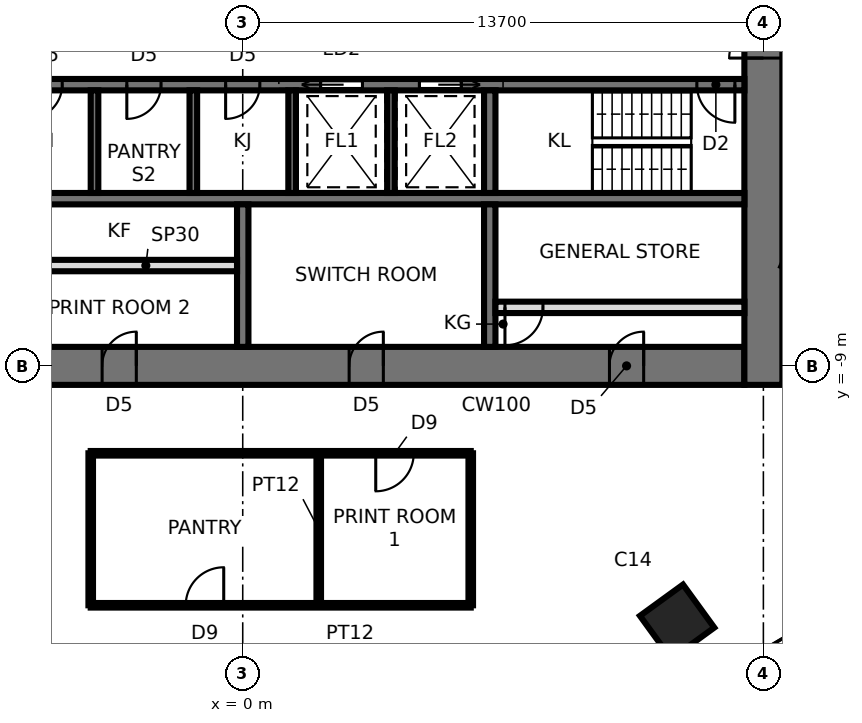
"""IFC4 building model, lengths in metres.
Left out: names, types, materials, properties, quantities, classifications, styles, units other than length and angle.
Written with IfcOpenShell. Run it as: python <this file> out.ifc"""

import sys

from ifc_helpers import new_model, si_unit, direction, frame, frame_2d, origin, origin_2d, place, context, subcontext, project, spatial, rectangle, extrude, element, fill, save


model = new_model("IFC4")
c1 = context("Model", 3, precision=1e-05, world=origin(), true_north=direction((0.0, 1.0)))
c2 = subcontext(c1, "Body", "Model", "MODEL_VIEW")
j1 = project(units=[si_unit("LENGTHUNIT", "METRE"), si_unit("PLANEANGLEUNIT", "RADIAN")], contexts=[c1])
p1 = place(None, origin())
s1 = spatial("IfcSite", under=j1, at=p1, CompositionType="ELEMENT")
p2 = place(p1, origin())
s2 = spatial("IfcBuilding", under=s1, at=p2, CompositionType="ELEMENT")
p3 = place(p2, frame((0.0, 0.0, 215.0)))
s3 = spatial("IfcBuildingStorey", under=s2, at=p3, CompositionType="ELEMENT", Elevation=215.0)
p4 = place(p3, frame((11.43, -15.733, 0.0), z_axis=(0.0, 0.0, 1.0), x_axis=(0.587785252292, -0.809016994375, 0.0)))
e1 = element("IfcColumn", 1, at=p4, inside=s3, PredefinedType="COLUMN", context=c2, shape_type="SweptSolid", body=[
    extrude(rectangle(XDim=1.4, YDim=1.4, at=origin_2d()), origin(), (0.0, 0.0, 1.0), 3.9),
])
p5 = place(p3, frame((-13.2, -9.0, 0.0), z_axis=(0.0, 0.0, 1.0), x_axis=(1.0, 0.0, 0.0)))
e2 = element("IfcWall", 2, at=p5, inside=s3, PredefinedType="SHEAR", context=c2, shape_type="SweptSolid", body=[
    extrude(rectangle(XDim=26.4, YDim=1.0, at=frame_2d((13.2, 0.0))), origin(), (0.0, 0.0, 1.0), 3.9),
])
p6 = place(p5, frame((2.65, 0.0, 0.0)))
e3 = element("IfcOpeningElement", 3, at=p6, cuts=e2, PredefinedType="OPENING", context=c2, shape_type="SweptSolid", body=[
    extrude(rectangle(XDim=0.9, YDim=2.1, at=frame_2d((0.45, 1.05))), frame((0.0, 0.51, 0.0), z_axis=(0.0, -1.0, 0.0), x_axis=(1.0, 0.0, 0.0)), (0.0, 0.0, 1.0), 1.02),
])
p7 = place(p5, frame((9.5, 0.0, 0.0)))
e4 = element("IfcOpeningElement", 4, at=p7, cuts=e2, PredefinedType="OPENING", context=c2, shape_type="SweptSolid", body=[
    extrude(rectangle(XDim=0.9, YDim=2.1, at=frame_2d((0.45, 1.05))), frame((0.0, 0.51, 0.0), z_axis=(0.0, -1.0, 0.0), x_axis=(1.0, 0.0, 0.0)), (0.0, 0.0, 1.0), 1.02),
])
p8 = place(p5, frame((16.0, 0.0, 0.0)))
e5 = element("IfcOpeningElement", 5, at=p8, cuts=e2, PredefinedType="OPENING", context=c2, shape_type="SweptSolid", body=[
    extrude(rectangle(XDim=0.9, YDim=2.1, at=frame_2d((0.45, 1.05))), frame((0.0, 0.51, 0.0), z_axis=(0.0, -1.0, 0.0), x_axis=(1.0, 0.0, 0.0)), (0.0, 0.0, 1.0), 1.02),
])
p9 = place(p5, frame((22.85, 0.0, 0.0)))
e6 = element("IfcOpeningElement", 6, at=p9, cuts=e2, PredefinedType="OPENING", context=c2, shape_type="SweptSolid", body=[
    extrude(rectangle(XDim=0.9, YDim=2.1, at=frame_2d((0.45, 1.05))), frame((0.0, 0.51, 0.0), z_axis=(0.0, -1.0, 0.0), x_axis=(1.0, 0.0, 0.0)), (0.0, 0.0, 1.0), 1.02),
])
p10 = place(p3, frame((13.7, -9.5, 0.0), z_axis=(0.0, 0.0, 1.0), x_axis=(0.0, 1.0, 0.0)))
e7 = element("IfcWall", 7, at=p10, inside=s3, PredefinedType="SHEAR", context=c2, shape_type="SweptSolid", body=[
    extrude(rectangle(XDim=19.0, YDim=1.0, at=frame_2d((9.5, 0.0))), origin(), (0.0, 0.0, 1.0), 3.9),
])
p11 = place(p10, frame((8.6, 0.0, 0.0)))
e8 = element("IfcOpeningElement", 8, at=p11, cuts=e7, PredefinedType="OPENING", context=c2, shape_type="SweptSolid", body=[
    extrude(rectangle(XDim=1.8, YDim=2.4, at=frame_2d((0.9, 1.2))), frame((0.0, 0.51, 0.0), z_axis=(0.0, -1.0, 0.0), x_axis=(1.0, 0.0, 0.0)), (0.0, 0.0, 1.0), 1.02),
])
p12 = place(p3, frame((-13.2, -1.6, 0.0), z_axis=(0.0, 0.0, 1.0), x_axis=(1.0, 0.0, 0.0)))
e9 = element("IfcWall", 9, at=p12, inside=s3, PredefinedType="SHEAR", context=c2, shape_type="SweptSolid", body=[
    extrude(rectangle(XDim=26.4, YDim=0.3, at=frame_2d((13.2, 0.0))), origin(), (0.0, 0.0, 1.0), 3.9),
])
p13 = place(p12, frame((25.15, 0.0, 0.0)))
e10 = element("IfcOpeningElement", 10, at=p13, cuts=e9, PredefinedType="OPENING", context=c2, shape_type="SweptSolid", body=[
    extrude(rectangle(XDim=1.0, YDim=2.1, at=frame_2d((0.5, 1.05))), frame((0.0, 0.16, 0.0), z_axis=(0.0, -1.0, 0.0), x_axis=(1.0, 0.0, 0.0)), (0.0, 0.0, 1.0), 0.32),
])
p14 = place(p12, frame((7.55, 0.0, 0.0)))
e11 = element("IfcOpeningElement", 11, at=p14, cuts=e9, PredefinedType="OPENING", context=c2, shape_type="SweptSolid", body=[
    extrude(rectangle(XDim=0.9, YDim=2.1, at=frame_2d((0.45, 1.05))), frame((0.0, 0.16, 0.0), z_axis=(0.0, -1.0, 0.0), x_axis=(1.0, 0.0, 0.0)), (0.0, 0.0, 1.0), 0.32),
])
p15 = place(p12, frame((10.15, 0.0, 0.0)))
e12 = element("IfcOpeningElement", 12, at=p15, cuts=e9, PredefinedType="OPENING", context=c2, shape_type="SweptSolid", body=[
    extrude(rectangle(XDim=0.9, YDim=2.1, at=frame_2d((0.45, 1.05))), frame((0.0, 0.16, 0.0), z_axis=(0.0, -1.0, 0.0), x_axis=(1.0, 0.0, 0.0)), (0.0, 0.0, 1.0), 0.32),
])
p16 = place(p12, frame((12.75, 0.0, 0.0)))
e13 = element("IfcOpeningElement", 13, at=p16, cuts=e9, PredefinedType="OPENING", context=c2, shape_type="SweptSolid", body=[
    extrude(rectangle(XDim=0.9, YDim=2.1, at=frame_2d((0.45, 1.05))), frame((0.0, 0.16, 0.0), z_axis=(0.0, -1.0, 0.0), x_axis=(1.0, 0.0, 0.0)), (0.0, 0.0, 1.0), 0.32),
])
p17 = place(p12, frame((15.25, 0.0, 0.0)))
e14 = element("IfcOpeningElement", 14, at=p17, cuts=e9, PredefinedType="OPENING", context=c2, shape_type="SweptSolid", body=[
    extrude(rectangle(XDim=1.1, YDim=2.3, at=frame_2d((0.55, 1.15))), frame((0.0, 0.16, 0.0), z_axis=(0.0, -1.0, 0.0), x_axis=(1.0, 0.0, 0.0)), (0.0, 0.0, 1.0), 0.32),
])
p18 = place(p12, frame((17.85, 0.0, 0.0)))
e15 = element("IfcOpeningElement", 15, at=p18, cuts=e9, PredefinedType="OPENING", context=c2, shape_type="SweptSolid", body=[
    extrude(rectangle(XDim=1.1, YDim=2.3, at=frame_2d((0.55, 1.15))), frame((0.0, 0.16, 0.0), z_axis=(0.0, -1.0, 0.0), x_axis=(1.0, 0.0, 0.0)), (0.0, 0.0, 1.0), 0.32),
])
p19 = place(p12, frame((4.85, 0.0, 0.0)))
e16 = element("IfcOpeningElement", 16, at=p19, cuts=e9, PredefinedType="OPENING", context=c2, shape_type="SweptSolid", body=[
    extrude(rectangle(XDim=1.1, YDim=2.3, at=frame_2d((0.55, 1.15))), frame((0.0, 0.16, 0.0), z_axis=(0.0, -1.0, 0.0), x_axis=(1.0, 0.0, 0.0)), (0.0, 0.0, 1.0), 0.32),
])
p20 = place(p12, frame((2.25, 0.0, 0.0)))
e17 = element("IfcOpeningElement", 17, at=p20, cuts=e9, PredefinedType="OPENING", context=c2, shape_type="SweptSolid", body=[
    extrude(rectangle(XDim=1.1, YDim=2.3, at=frame_2d((0.55, 1.15))), frame((0.0, 0.16, 0.0), z_axis=(0.0, -1.0, 0.0), x_axis=(1.0, 0.0, 0.0)), (0.0, 0.0, 1.0), 0.32),
])
p21 = place(p12, frame((0.35, 0.0, 0.0)))
e18 = element("IfcOpeningElement", 18, at=p21, cuts=e9, PredefinedType="OPENING", context=c2, shape_type="SweptSolid", body=[
    extrude(rectangle(XDim=0.9, YDim=2.1, at=frame_2d((0.45, 1.05))), frame((0.0, 0.16, 0.0), z_axis=(0.0, -1.0, 0.0), x_axis=(1.0, 0.0, 0.0)), (0.0, 0.0, 1.0), 0.32),
])
p22 = place(p3, frame((-13.2, -4.6, 0.0), z_axis=(0.0, 0.0, 1.0), x_axis=(1.0, 0.0, 0.0)))
e19 = element("IfcWall", 19, at=p22, inside=s3, PredefinedType="SHEAR", context=c2, shape_type="SweptSolid", body=[
    extrude(rectangle(XDim=26.4, YDim=0.3, at=frame_2d((13.2, 0.0))), origin(), (0.0, 0.0, 1.0), 3.9),
])
p23 = place(p3, frame((6.5, -1.75, 0.0), z_axis=(0.0, 0.0, 1.0), x_axis=(0.0, -1.0, 0.0)))
e20 = element("IfcWall", 20, at=p23, inside=s3, PredefinedType="SHEAR", context=c2, shape_type="SweptSolid", body=[
    extrude(rectangle(XDim=2.7, YDim=0.3, at=frame_2d((1.35, 0.0))), origin(), (0.0, 0.0, 1.0), 3.9),
])
p24 = place(p3, frame((6.5, -4.75, 0.0), z_axis=(0.0, 0.0, 1.0), x_axis=(0.0, -1.0, 0.0)))
e21 = element("IfcWall", 21, at=p24, inside=s3, PredefinedType="SHEAR", context=c2, shape_type="SweptSolid", body=[
    extrude(rectangle(XDim=3.75, YDim=0.3, at=frame_2d((1.875, 0.0))), origin(), (0.0, 0.0, 1.0), 3.9),
])
for number, where, z_axis, x_axis in (
    (22, (-3.9, -1.75, 0.0), (0.0, 0.0, 1.0), (0.0, -1.0, 0.0)),
    (23, (-1.3, -1.75, 0.0), (0.0, 0.0, 1.0), (0.0, -1.0, 0.0)),
    (24, (1.3, -1.75, 0.0), (0.0, 0.0, 1.0), (0.0, -1.0, 0.0)),
    (25, (3.9, -1.75, 0.0), (0.0, 0.0, 1.0), (0.0, -1.0, 0.0)),
):
    element("IfcWall", number, at=place(p3, frame(where, z_axis=z_axis, x_axis=x_axis)), inside=s3, PredefinedType="SHEAR", context=c2, shape_type="SweptSolid", body=[
        extrude(rectangle(XDim=2.7, YDim=0.2, at=frame_2d((1.35, 0.0))), origin(), (0.0, 0.0, 1.0), 3.9),
    ])
p25 = place(p3, frame((0.0, -4.75, 0.0), z_axis=(0.0, 0.0, 1.0), x_axis=(0.0, -1.0, 0.0)))
e26 = element("IfcWall", 26, at=p25, inside=s3, PredefinedType="SHEAR", context=c2, shape_type="SweptSolid", body=[
    extrude(rectangle(XDim=3.75, YDim=0.3, at=frame_2d((1.875, 0.0))), origin(), (0.0, 0.0, 1.0), 3.9),
])
p26 = place(p3, frame((-6.35, -6.36, 0.0), z_axis=(0.0, 0.0, 1.0), x_axis=(1.0, 0.0, 0.0)))
e27 = element("IfcWall", 27, at=p26, inside=s3, PredefinedType="PARTITIONING", context=c2, shape_type="SweptSolid", body=[
    extrude(rectangle(XDim=6.2, YDim=0.3, at=frame_2d((3.1, 0.0))), origin(), (0.0, 0.0, 1.0), 3.74),
])
p27 = place(p26, frame((0.25, 0.0, 0.0)))
e28 = element("IfcOpeningElement", 28, at=p27, cuts=e27, PredefinedType="OPENING", context=c2, shape_type="SweptSolid", body=[
    extrude(rectangle(XDim=1.0, YDim=2.4, at=frame_2d((0.5, 1.2))), frame((0.0, 0.16, 0.0), z_axis=(0.0, -1.0, 0.0), x_axis=(1.0, 0.0, 0.0)), (0.0, 0.0, 1.0), 0.32),
])
p28 = place(p3, frame((6.65, -7.46, 0.0), z_axis=(0.0, 0.0, 1.0), x_axis=(1.0, 0.0, 0.0)))
e29 = element("IfcWall", 29, at=p28, inside=s3, PredefinedType="PARTITIONING", context=c2, shape_type="SweptSolid", body=[
    extrude(rectangle(XDim=6.55, YDim=0.3, at=frame_2d((3.275, 0.0))), origin(), (0.0, 0.0, 1.0), 3.74),
])
p29 = place(p28, frame((0.25, 0.0, 0.0)))
e30 = element("IfcOpeningElement", 30, at=p29, cuts=e29, PredefinedType="OPENING", context=c2, shape_type="SweptSolid", body=[
    extrude(rectangle(XDim=1.0, YDim=2.4, at=frame_2d((0.5, 1.2))), frame((0.0, 0.16, 0.0), z_axis=(0.0, -1.0, 0.0), x_axis=(1.0, 0.0, 0.0)), (0.0, 0.0, 1.0), 0.32),
])
p30 = place(p3, frame((-4.0, -15.3, 0.0), z_axis=(0.0, 0.0, 1.0), x_axis=(0.0, 1.0, 0.0)))
e31 = element("IfcWall", 31, at=p30, inside=s3, PredefinedType="PARTITIONING", context=c2, shape_type="SweptSolid", body=[
    extrude(rectangle(XDim=4.0, YDim=0.12, at=frame_2d((2.0, 0.0))), origin(), (0.0, 0.0, 1.0), 3.74),
])
p31 = place(p3, frame((6.0, -15.3, 0.0), z_axis=(0.0, 0.0, 1.0), x_axis=(-1.0, 0.0, 0.0)))
e32 = element("IfcWall", 32, at=p31, inside=s3, PredefinedType="PARTITIONING", context=c2, shape_type="SweptSolid", body=[
    extrude(rectangle(XDim=10.0, YDim=0.12, at=frame_2d((5.0, 0.0))), origin(), (0.0, 0.0, 1.0), 3.334),
])
p32 = place(p31, frame((6.5, 0.0, 0.0)))
e33 = element("IfcOpeningElement", 33, at=p32, cuts=e32, PredefinedType="OPENING", context=c2, shape_type="SweptSolid", body=[
    extrude(rectangle(XDim=1.0, YDim=2.4, at=frame_2d((0.5, 1.2))), frame((0.0, 0.07, 0.0), z_axis=(0.0, -1.0, 0.0), x_axis=(1.0, 0.0, 0.0)), (0.0, 0.0, 1.0), 0.14),
])
p33 = place(p3, frame((-4.0, -11.3, 0.0), z_axis=(0.0, 0.0, 1.0), x_axis=(1.0, 0.0, 0.0)))
e34 = element("IfcWall", 34, at=p33, inside=s3, PredefinedType="PARTITIONING", context=c2, shape_type="SweptSolid", body=[
    extrude(rectangle(XDim=10.0, YDim=0.12, at=frame_2d((5.0, 0.0))), origin(), (0.0, 0.0, 1.0), 3.74),
])
p34 = place(p33, frame((7.5, 0.0, 0.0)))
e35 = element("IfcOpeningElement", 35, at=p34, cuts=e34, PredefinedType="OPENING", context=c2, shape_type="SweptSolid", body=[
    extrude(rectangle(XDim=1.0, YDim=2.4, at=frame_2d((0.5, 1.2))), frame((0.0, 0.07, 0.0), z_axis=(0.0, -1.0, 0.0), x_axis=(1.0, 0.0, 0.0)), (0.0, 0.0, 1.0), 0.14),
])
for number, where, z_axis, x_axis in (
    (36, (2.0, -11.3, 0.0), (0.0, 0.0, 1.0), (0.0, -1.0, 0.0)),
    (37, (6.0, -11.3, 0.0), (0.0, 0.0, 1.0), (0.0, -1.0, 0.0)),
):
    element("IfcWall", number, at=place(p3, frame(where, z_axis=z_axis, x_axis=x_axis)), inside=s3, PredefinedType="PARTITIONING", context=c2, shape_type="SweptSolid", body=[
        extrude(rectangle(XDim=4.0, YDim=0.12, at=frame_2d((2.0, 0.0))), origin(), (0.0, 0.0, 1.0), 3.74),
    ])
p35 = place(p3, frame((20.989, -9.345, 0.0), z_axis=(0.0, 0.0, 1.0), x_axis=(-0.913544472316, 0.406738856147, 0.0)))
e38 = element("IfcWall", 38, at=p35, inside=s3, PredefinedType="PARTITIONING", context=c2, shape_type="SweptSolid", body=[
    extrude(rectangle(XDim=7.432, YDim=0.12, at=frame_2d((3.716, 0.0))), origin(), (0.0, 0.0, 1.0), 3.74),
])
p36 = place(p11, origin())
e39 = element("IfcDoor", 39, at=p36, inside=s3, OperationType="DOUBLE_DOOR_SINGLE_SWING", PredefinedType="DOOR", context=c2, shape_type="SweptSolid", body=[
    extrude(rectangle(XDim=1.72, YDim=2.36, at=frame_2d((0.9, 1.18))), frame((0.0, 0.025, 0.0), z_axis=(0.0, -1.0, 0.0), x_axis=(1.0, 0.0, 0.0)), (0.0, 0.0, 1.0), 0.05),
    extrude(rectangle(XDim=0.04, YDim=2.4, at=frame_2d((0.02, 1.2))), frame((0.0, 0.25, 0.0), z_axis=(0.0, -1.0, 0.0), x_axis=(1.0, 0.0, 0.0)), (0.0, 0.0, 1.0), 0.5),
    extrude(rectangle(XDim=0.04, YDim=2.4, at=frame_2d((1.78, 1.2))), frame((0.0, 0.25, 0.0), z_axis=(0.0, -1.0, 0.0), x_axis=(1.0, 0.0, 0.0)), (0.0, 0.0, 1.0), 0.5),
    extrude(rectangle(XDim=1.72, YDim=0.04, at=frame_2d((0.9, 2.38))), frame((0.0, 0.25, 0.0), z_axis=(0.0, -1.0, 0.0), x_axis=(1.0, 0.0, 0.0)), (0.0, 0.0, 1.0), 0.5),
])
fill(e8, e39)
p37 = place(p13, frame((1.0, 0.0, 0.0), z_axis=(0.0, 0.0, 1.0), x_axis=(-1.0, 0.0, 0.0)))
e40 = element("IfcDoor", 40, at=p37, inside=s3, OperationType="SINGLE_SWING_LEFT", PredefinedType="DOOR", context=c2, shape_type="SweptSolid", body=[
    extrude(rectangle(XDim=1.0, YDim=2.1, at=frame_2d((0.5, 1.05))), frame((0.0, 0.025, 0.0), z_axis=(0.0, -1.0, 0.0), x_axis=(1.0, 0.0, 0.0)), (0.0, 0.0, 1.0), 0.05),
])
fill(e10, e40)
p38 = place(p14, frame((0.9, 0.0, 0.0), z_axis=(0.0, 0.0, 1.0), x_axis=(-1.0, 0.0, 0.0)))
e41 = element("IfcDoor", 41, at=p38, inside=s3, OperationType="SINGLE_SWING_RIGHT", PredefinedType="DOOR", context=c2, shape_type="SweptSolid", body=[
    extrude(rectangle(XDim=0.9, YDim=2.1, at=frame_2d((0.45, 1.05))), frame((0.0, 0.025, 0.0), z_axis=(0.0, -1.0, 0.0), x_axis=(1.0, 0.0, 0.0)), (0.0, 0.0, 1.0), 0.05),
])
fill(e11, e41)
p39 = place(p15, frame((0.9, 0.0, 0.0), z_axis=(0.0, 0.0, 1.0), x_axis=(-1.0, 0.0, 0.0)))
e42 = element("IfcDoor", 42, at=p39, inside=s3, OperationType="SINGLE_SWING_RIGHT", PredefinedType="DOOR", context=c2, shape_type="SweptSolid", body=[
    extrude(rectangle(XDim=0.9, YDim=2.1, at=frame_2d((0.45, 1.05))), frame((0.0, 0.025, 0.0), z_axis=(0.0, -1.0, 0.0), x_axis=(1.0, 0.0, 0.0)), (0.0, 0.0, 1.0), 0.05),
])
fill(e12, e42)
p40 = place(p16, frame((0.9, 0.0, 0.0), z_axis=(0.0, 0.0, 1.0), x_axis=(-1.0, 0.0, 0.0)))
e43 = element("IfcDoor", 43, at=p40, inside=s3, OperationType="SINGLE_SWING_RIGHT", PredefinedType="DOOR", context=c2, shape_type="SweptSolid", body=[
    extrude(rectangle(XDim=0.9, YDim=2.1, at=frame_2d((0.45, 1.05))), frame((0.0, 0.025, 0.0), z_axis=(0.0, -1.0, 0.0), x_axis=(1.0, 0.0, 0.0)), (0.0, 0.0, 1.0), 0.05),
])
fill(e13, e43)
p41 = place(p17, frame((1.1, 0.0, 0.0), z_axis=(0.0, 0.0, 1.0), x_axis=(-1.0, 0.0, 0.0)))
e44 = element("IfcDoor", 44, at=p41, inside=s3, OperationType="SLIDING_TO_RIGHT", PredefinedType="DOOR", context=c2, shape_type="SweptSolid", body=[
    extrude(rectangle(XDim=1.1, YDim=2.3, at=frame_2d((0.55, 1.15))), frame((0.0, 0.025, 0.0), z_axis=(0.0, -1.0, 0.0), x_axis=(1.0, 0.0, 0.0)), (0.0, 0.0, 1.0), 0.05),
])
fill(e14, e44)
p42 = place(p18, frame((1.1, 0.0, 0.0), z_axis=(0.0, 0.0, 1.0), x_axis=(-1.0, 0.0, 0.0)))
e45 = element("IfcDoor", 45, at=p42, inside=s3, OperationType="SLIDING_TO_LEFT", PredefinedType="DOOR", context=c2, shape_type="SweptSolid", body=[
    extrude(rectangle(XDim=1.1, YDim=2.3, at=frame_2d((0.55, 1.15))), frame((0.0, 0.025, 0.0), z_axis=(0.0, -1.0, 0.0), x_axis=(1.0, 0.0, 0.0)), (0.0, 0.0, 1.0), 0.05),
])
fill(e15, e45)
p43 = place(p7, origin())
e46 = element("IfcDoor", 46, at=p43, inside=s3, OperationType="SINGLE_SWING_RIGHT", PredefinedType="DOOR", context=c2, shape_type="SweptSolid", body=[
    extrude(rectangle(XDim=0.82, YDim=2.06, at=frame_2d((0.45, 1.03))), frame((0.0, 0.025, 0.0), z_axis=(0.0, -1.0, 0.0), x_axis=(1.0, 0.0, 0.0)), (0.0, 0.0, 1.0), 0.05),
    extrude(rectangle(XDim=0.04, YDim=2.1, at=frame_2d((0.02, 1.05))), frame((0.0, 0.25, 0.0), z_axis=(0.0, -1.0, 0.0), x_axis=(1.0, 0.0, 0.0)), (0.0, 0.0, 1.0), 0.5),
    extrude(rectangle(XDim=0.04, YDim=2.1, at=frame_2d((0.88, 1.05))), frame((0.0, 0.25, 0.0), z_axis=(0.0, -1.0, 0.0), x_axis=(1.0, 0.0, 0.0)), (0.0, 0.0, 1.0), 0.5),
    extrude(rectangle(XDim=0.82, YDim=0.04, at=frame_2d((0.45, 2.08))), frame((0.0, 0.25, 0.0), z_axis=(0.0, -1.0, 0.0), x_axis=(1.0, 0.0, 0.0)), (0.0, 0.0, 1.0), 0.5),
])
fill(e4, e46)
p44 = place(p8, origin())
e47 = element("IfcDoor", 47, at=p44, inside=s3, OperationType="SINGLE_SWING_RIGHT", PredefinedType="DOOR", context=c2, shape_type="SweptSolid", body=[
    extrude(rectangle(XDim=0.82, YDim=2.06, at=frame_2d((0.45, 1.03))), frame((0.0, 0.025, 0.0), z_axis=(0.0, -1.0, 0.0), x_axis=(1.0, 0.0, 0.0)), (0.0, 0.0, 1.0), 0.05),
    extrude(rectangle(XDim=0.04, YDim=2.1, at=frame_2d((0.02, 1.05))), frame((0.0, 0.25, 0.0), z_axis=(0.0, -1.0, 0.0), x_axis=(1.0, 0.0, 0.0)), (0.0, 0.0, 1.0), 0.5),
    extrude(rectangle(XDim=0.04, YDim=2.1, at=frame_2d((0.88, 1.05))), frame((0.0, 0.25, 0.0), z_axis=(0.0, -1.0, 0.0), x_axis=(1.0, 0.0, 0.0)), (0.0, 0.0, 1.0), 0.5),
    extrude(rectangle(XDim=0.82, YDim=0.04, at=frame_2d((0.45, 2.08))), frame((0.0, 0.25, 0.0), z_axis=(0.0, -1.0, 0.0), x_axis=(1.0, 0.0, 0.0)), (0.0, 0.0, 1.0), 0.5),
])
fill(e5, e47)
p45 = place(p9, origin())
e48 = element("IfcDoor", 48, at=p45, inside=s3, OperationType="SINGLE_SWING_RIGHT", PredefinedType="DOOR", context=c2, shape_type="SweptSolid", body=[
    extrude(rectangle(XDim=0.82, YDim=2.06, at=frame_2d((0.45, 1.03))), frame((0.0, 0.025, 0.0), z_axis=(0.0, -1.0, 0.0), x_axis=(1.0, 0.0, 0.0)), (0.0, 0.0, 1.0), 0.05),
    extrude(rectangle(XDim=0.04, YDim=2.1, at=frame_2d((0.02, 1.05))), frame((0.0, 0.25, 0.0), z_axis=(0.0, -1.0, 0.0), x_axis=(1.0, 0.0, 0.0)), (0.0, 0.0, 1.0), 0.5),
    extrude(rectangle(XDim=0.04, YDim=2.1, at=frame_2d((0.88, 1.05))), frame((0.0, 0.25, 0.0), z_axis=(0.0, -1.0, 0.0), x_axis=(1.0, 0.0, 0.0)), (0.0, 0.0, 1.0), 0.5),
    extrude(rectangle(XDim=0.82, YDim=0.04, at=frame_2d((0.45, 2.08))), frame((0.0, 0.25, 0.0), z_axis=(0.0, -1.0, 0.0), x_axis=(1.0, 0.0, 0.0)), (0.0, 0.0, 1.0), 0.5),
])
fill(e6, e48)
p46 = place(p29, frame((1.0, 0.0, 0.0), z_axis=(0.0, 0.0, 1.0), x_axis=(-1.0, 0.0, 0.0)))
e49 = element("IfcDoor", 49, at=p46, inside=s3, OperationType="SINGLE_SWING_RIGHT", PredefinedType="DOOR", context=c2, shape_type="SweptSolid", body=[
    extrude(rectangle(XDim=1.0, YDim=2.4, at=frame_2d((0.5, 1.2))), frame((0.0, 0.025, 0.0), z_axis=(0.0, -1.0, 0.0), x_axis=(1.0, 0.0, 0.0)), (0.0, 0.0, 1.0), 0.05),
])
fill(e30, e49)
p47 = place(p32, frame((1.0, 0.0, 0.0), z_axis=(0.0, 0.0, 1.0), x_axis=(-1.0, 0.0, 0.0)))
e50 = element("IfcDoor", 50, at=p47, inside=s3, OperationType="SINGLE_SWING_RIGHT", PredefinedType="DOOR", context=c2, shape_type="SweptSolid", body=[
    extrude(rectangle(XDim=1.0, YDim=2.4, at=frame_2d((0.5, 1.2))), frame((0.0, 0.025, 0.0), z_axis=(0.0, -1.0, 0.0), x_axis=(1.0, 0.0, 0.0)), (0.0, 0.0, 1.0), 0.05),
])
fill(e33, e50)
p48 = place(p34, frame((1.0, 0.0, 0.0), z_axis=(0.0, 0.0, 1.0), x_axis=(-1.0, 0.0, 0.0)))
e51 = element("IfcDoor", 51, at=p48, inside=s3, OperationType="SINGLE_SWING_RIGHT", PredefinedType="DOOR", context=c2, shape_type="SweptSolid", body=[
    extrude(rectangle(XDim=1.0, YDim=2.4, at=frame_2d((0.5, 1.2))), frame((0.0, 0.025, 0.0), z_axis=(0.0, -1.0, 0.0), x_axis=(1.0, 0.0, 0.0)), (0.0, 0.0, 1.0), 0.05),
])
fill(e35, e51)
save(model, sys.argv[1])
